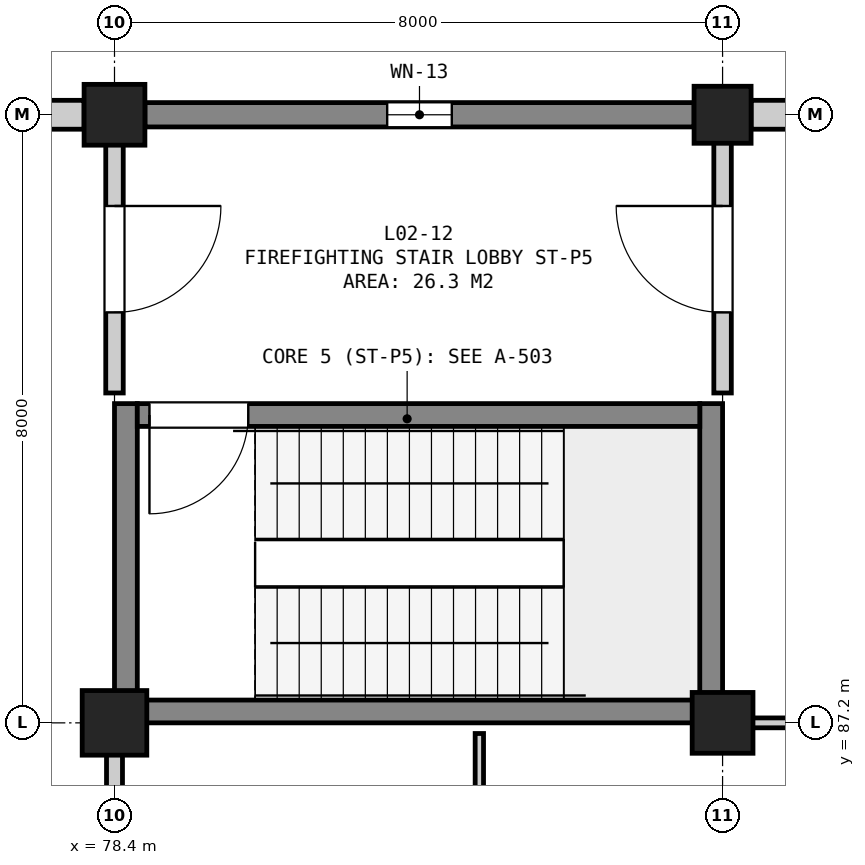
"""IFC4 building model, lengths in metres.
Left out: names, types, materials, properties, quantities, classifications, styles, units other than length and angle.
Written with IfcOpenShell. Run it as: python <this file> out.ifc"""

import sys

from ifc_helpers import new_model, si_unit, direction, frame, frame_2d, origin, origin_2d, place, context, subcontext, project, spatial, rectangle, extrude, element, fill, save


model = new_model("IFC4")
c1 = context("Model", 3, precision=1e-05, world=origin(), true_north=direction((0.0, 1.0)))
c2 = subcontext(c1, "Body", "Model", "MODEL_VIEW")
j1 = project(units=[si_unit("LENGTHUNIT", "METRE"), si_unit("PLANEANGLEUNIT", "RADIAN")], contexts=[c1])
p1 = place(None, origin())
s1 = spatial("IfcSite", under=j1, at=p1, CompositionType="ELEMENT")
p2 = place(p1, origin())
s2 = spatial("IfcBuilding", under=s1, at=p2, CompositionType="ELEMENT")
p3 = place(p2, frame((0.0, 0.0, 10.8)))
s3 = spatial("IfcBuildingStorey", under=s2, at=p3, CompositionType="ELEMENT", Elevation=10.8)
p4 = place(p3, frame((78.4, 87.2, 0.0), z_axis=(0.0, 0.0, 1.0), x_axis=(1.0, 0.0, 0.0)))
e1 = element("IfcColumn", 1, at=p4, inside=s3, PredefinedType="COLUMN", context=c2, shape_type="SweptSolid", body=[
    extrude(rectangle(XDim=0.85, YDim=0.85, at=origin_2d()), origin(), (0.0, 0.0, 1.0), 4.8),
])
for number, where, z_axis, x_axis in (
    (2, (78.4, 95.2, 0.0), (0.0, 0.0, 1.0), (1.0, 0.0, 0.0)),
    (3, (86.4, 87.2, 0.0), (0.0, 0.0, 1.0), (1.0, 0.0, 0.0)),
):
    element("IfcColumn", number, at=place(p3, frame(where, z_axis=z_axis, x_axis=x_axis)), inside=s3, PredefinedType="COLUMN", context=c2, shape_type="SweptSolid", body=[
        extrude(rectangle(XDim=0.8, YDim=0.8, at=origin_2d()), origin(), (0.0, 0.0, 1.0), 4.8),
    ])
p5 = place(p3, frame((86.4, 95.2, 0.0), z_axis=(0.0, 0.0, 1.0), x_axis=(1.0, 0.0, 0.0)))
e4 = element("IfcColumn", 4, at=p5, inside=s3, PredefinedType="COLUMN", context=c2, shape_type="SweptSolid", body=[
    extrude(rectangle(XDim=0.75, YDim=0.75, at=origin_2d()), origin(), (0.0, 0.0, 1.0), 4.8),
])
p6 = place(p3, frame((102.2, 95.2, 0.0), z_axis=(0.0, 0.0, 1.0), x_axis=(-1.0, 0.0, 0.0)))
e5 = element("IfcWall", 5, at=p6, inside=s3, PredefinedType="SOLIDWALL", context=c2, shape_type="SweptSolid", body=[
    extrude(rectangle(XDim=15.425, YDim=0.38, at=frame_2d((7.712, 0.0))), origin(), (0.0, 0.0, 1.0), 3.885),
])
p7 = place(p6, frame((7.238, 0.0, 0.9)))
e6 = element("IfcOpeningElement", 6, at=p7, cuts=e5, PredefinedType="OPENING", context=c2, shape_type="SweptSolid", body=[
    extrude(rectangle(XDim=0.95, YDim=1.45, at=frame_2d((0.475, 0.725))), frame((0.0, 0.202, 0.0), z_axis=(0.0, -1.0, 0.0), x_axis=(1.0, 0.0, 0.0)), (0.0, 0.0, 1.0), 0.404),
])
p8 = place(p3, frame((86.025, 95.2, 0.0), z_axis=(0.0, 0.0, 1.0), x_axis=(-1.0, 0.0, 0.0)))
e7 = element("IfcWall", 7, at=p8, inside=s3, PredefinedType="SOLIDWALL", context=c2, shape_type="SweptSolid", body=[
    extrude(rectangle(XDim=7.225, YDim=0.32, at=frame_2d((3.612, 0.0))), origin(), (0.0, 0.0, 1.0), 3.975),
])
p9 = place(p8, frame((3.188, 0.0, 0.9)))
e8 = element("IfcOpeningElement", 8, at=p9, cuts=e7, PredefinedType="OPENING", context=c2, shape_type="SweptSolid", body=[
    extrude(rectangle(XDim=0.85, YDim=1.35, at=frame_2d((0.425, 0.675))), frame((0.0, 0.172, 0.0), z_axis=(0.0, -1.0, 0.0), x_axis=(1.0, 0.0, 0.0)), (0.0, 0.0, 1.0), 0.344),
])
p10 = place(p3, frame((78.0, 95.2, 0.0), z_axis=(0.0, 0.0, 1.0), x_axis=(-1.0, 0.0, 0.0)))
e9 = element("IfcWall", 9, at=p10, inside=s3, PredefinedType="SOLIDWALL", context=c2, shape_type="SweptSolid", body=[
    extrude(rectangle(XDim=15.4, YDim=0.38, at=frame_2d((7.7, 0.0))), origin(), (0.0, 0.0, 1.0), 3.485),
])
for number, where, z_axis, x_axis in (
    (10, (78.55, 87.2, 0.0), (0.0, 0.0, 1.0), (0.0, 1.0, 0.0)),
    (11, (86.25, 87.2, 0.0), (0.0, 0.0, 1.0), (0.0, 1.0, 0.0)),
):
    element("IfcWall", number, at=place(p3, frame(where, z_axis=z_axis, x_axis=x_axis)), inside=s3, PredefinedType="SHEAR", context=c2, shape_type="SweptSolid", body=[
        extrude(rectangle(XDim=4.2, YDim=0.3, at=frame_2d((2.1, 0.0))), origin(), (0.0, 0.0, 1.0), 4.5),
    ])
p11 = place(p3, frame((78.7, 87.35, 0.0), z_axis=(0.0, 0.0, 1.0), x_axis=(1.0, 0.0, 0.0)))
e12 = element("IfcWall", 12, at=p11, inside=s3, PredefinedType="SHEAR", context=c2, shape_type="SweptSolid", body=[
    extrude(rectangle(XDim=7.4, YDim=0.3, at=frame_2d((3.7, 0.0))), origin(), (0.0, 0.0, 1.0), 4.5),
])
p12 = place(p3, frame((78.7, 91.25, 0.0), z_axis=(0.0, 0.0, 1.0), x_axis=(1.0, 0.0, 0.0)))
e13 = element("IfcWall", 13, at=p12, inside=s3, PredefinedType="SHEAR", context=c2, shape_type="SweptSolid", body=[
    extrude(rectangle(XDim=7.4, YDim=0.3, at=frame_2d((3.7, 0.0))), origin(), (0.0, 0.0, 1.0), 4.5),
])
p13 = place(p12, frame((0.16, 0.0, 0.0)))
e14 = element("IfcOpeningElement", 14, at=p13, cuts=e13, PredefinedType="OPENING", context=c2, shape_type="SweptSolid", body=[
    extrude(rectangle(XDim=1.3, YDim=2.18, at=frame_2d((0.65, 1.09))), frame((0.0, 0.162, 0.0), z_axis=(0.0, -1.0, 0.0), x_axis=(1.0, 0.0, 0.0)), (0.0, 0.0, 1.0), 0.324),
])
p14 = place(p3, frame((78.4, 91.54, 0.0), z_axis=(0.0, 0.0, 1.0), x_axis=(0.0, 1.0, 0.0)))
e15 = element("IfcWall", 15, at=p14, inside=s3, PredefinedType="SOLIDWALL", context=c2, shape_type="SweptSolid", body=[
    extrude(rectangle(XDim=3.555, YDim=0.23, at=frame_2d((1.777, 0.0))), origin(), (0.0, 0.0, 1.0), 4.045),
])
p15 = place(p14, frame((1.06, 0.0, 0.0)))
e16 = element("IfcOpeningElement", 16, at=p15, cuts=e15, PredefinedType="OPENING", context=c2, shape_type="SweptSolid", body=[
    extrude(rectangle(XDim=1.4, YDim=2.2, at=frame_2d((0.7, 1.1))), frame((0.0, 0.127, 0.0), z_axis=(0.0, -1.0, 0.0), x_axis=(1.0, 0.0, 0.0)), (0.0, 0.0, 1.0), 0.254),
])
p16 = place(p3, frame((86.4, 91.54, 0.0), z_axis=(0.0, 0.0, 1.0), x_axis=(0.0, 1.0, 0.0)))
e17 = element("IfcWall", 17, at=p16, inside=s3, PredefinedType="SOLIDWALL", context=c2, shape_type="SweptSolid", body=[
    extrude(rectangle(XDim=3.555, YDim=0.23, at=frame_2d((1.777, 0.0))), origin(), (0.0, 0.0, 1.0), 3.895),
])
p17 = place(p16, frame((1.06, 0.0, 0.0)))
e18 = element("IfcOpeningElement", 18, at=p17, cuts=e17, PredefinedType="OPENING", context=c2, shape_type="SweptSolid", body=[
    extrude(rectangle(XDim=1.4, YDim=2.2, at=frame_2d((0.7, 1.1))), frame((0.0, 0.127, 0.0), z_axis=(0.0, -1.0, 0.0), x_axis=(1.0, 0.0, 0.0)), (0.0, 0.0, 1.0), 0.254),
])
p18 = place(p3, frame((78.4, 76.14, 0.0), z_axis=(0.0, 0.0, 1.0), x_axis=(0.0, 1.0, 0.0)))
e19 = element("IfcWall", 19, at=p18, inside=s3, PredefinedType="SOLIDWALL", context=c2, shape_type="SweptSolid", body=[
    extrude(rectangle(XDim=10.92, YDim=0.21, at=frame_2d((5.46, 0.0))), origin(), (0.0, 0.0, 1.0), 3.895),
])
p19 = place(p18, frame((4.76, 0.0, 0.0)))
e20 = element("IfcOpeningElement", 20, at=p19, cuts=e19, PredefinedType="OPENING", context=c2, shape_type="SweptSolid", body=[
    extrude(rectangle(XDim=1.4, YDim=2.2, at=frame_2d((0.7, 1.1))), frame((0.0, 0.117, 0.0), z_axis=(0.0, -1.0, 0.0), x_axis=(1.0, 0.0, 0.0)), (0.0, 0.0, 1.0), 0.234),
])
p20 = place(p3, frame((86.24, 87.2, 0.0), z_axis=(0.0, 0.0, 1.0), x_axis=(1.0, 0.0, 0.0)))
e21 = element("IfcWall", 21, at=p20, inside=s3, PredefinedType="PARTITIONING", context=c2, shape_type="SweptSolid", body=[
    extrude(rectangle(XDim=34.42, YDim=0.13, at=frame_2d((17.21, 0.0))), origin(), (0.0, 0.0, 1.0), 3.345),
])
p21 = place(p3, frame((83.2, 76.14, 0.0), z_axis=(0.0, 0.0, 1.0), x_axis=(0.0, 1.0, 0.0)))
e22 = element("IfcWall", 22, at=p21, inside=s3, PredefinedType="PARTITIONING", context=c2, shape_type="SweptSolid", body=[
    extrude(rectangle(XDim=10.92, YDim=0.11, at=frame_2d((5.46, 0.0))), origin(), (0.0, 0.0, 1.0), 4.5),
])
p22 = place(p21, frame((4.81, 0.0, 0.0)))
e23 = element("IfcOpeningElement", 23, at=p22, cuts=e22, PredefinedType="OPENING", context=c2, shape_type="SweptSolid", body=[
    extrude(rectangle(XDim=1.3, YDim=2.15, at=frame_2d((0.65, 1.075))), frame((0.0, 0.067, 0.0), z_axis=(0.0, -1.0, 0.0), x_axis=(1.0, 0.0, 0.0)), (0.0, 0.0, 1.0), 0.134),
])
p23 = place(p9, origin())
e24 = element("IfcWindow", 24, at=p23, inside=s3, PartitioningType="SINGLE_PANEL", PredefinedType="WINDOW", context=c2, shape_type="SweptSolid", body=[
    extrude(rectangle(XDim=0.85, YDim=1.35, at=frame_2d((0.425, 0.675))), frame((0.0, 0.03, 0.0), z_axis=(0.0, -1.0, 0.0), x_axis=(1.0, 0.0, 0.0)), (0.0, 0.0, 1.0), 0.06),
])
fill(e8, e24)
p24 = place(p13, frame((1.3, 0.0, 0.0), z_axis=(0.0, 0.0, 1.0), x_axis=(-1.0, 0.0, 0.0)))
e25 = element("IfcDoor", 25, at=p24, inside=s3, OperationType="SINGLE_SWING_RIGHT", PredefinedType="DOOR", context=c2, shape_type="SweptSolid", body=[
    extrude(rectangle(XDim=1.3, YDim=2.18, at=frame_2d((0.65, 1.09))), frame((0.0, 0.025, 0.0), z_axis=(0.0, -1.0, 0.0), x_axis=(1.0, 0.0, 0.0)), (0.0, 0.0, 1.0), 0.05),
])
fill(e14, e25)
p25 = place(p15, frame((1.4, 0.0, 0.0), z_axis=(0.0, 0.0, 1.0), x_axis=(-1.0, 0.0, 0.0)))
e26 = element("IfcDoor", 26, at=p25, inside=s3, OperationType="SINGLE_SWING_LEFT", PredefinedType="DOOR", context=c2, shape_type="SweptSolid", body=[
    extrude(rectangle(XDim=1.4, YDim=2.2, at=frame_2d((0.7, 1.1))), frame((0.0, 0.025, 0.0), z_axis=(0.0, -1.0, 0.0), x_axis=(1.0, 0.0, 0.0)), (0.0, 0.0, 1.0), 0.05),
])
fill(e16, e26)
p26 = place(p17, origin())
e27 = element("IfcDoor", 27, at=p26, inside=s3, OperationType="SINGLE_SWING_RIGHT", PredefinedType="DOOR", context=c2, shape_type="SweptSolid", body=[
    extrude(rectangle(XDim=1.4, YDim=2.2, at=frame_2d((0.7, 1.1))), frame((0.0, 0.025, 0.0), z_axis=(0.0, -1.0, 0.0), x_axis=(1.0, 0.0, 0.0)), (0.0, 0.0, 1.0), 0.05),
])
fill(e18, e27)
save(model, sys.argv[1])
